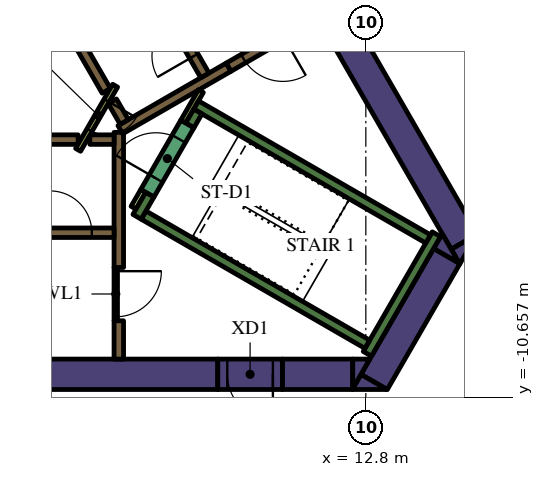
"""IFC4 building model, lengths in metres.
Left out: names, types, materials, properties, quantities, classifications, styles, units other than length and angle.
Written with IfcOpenShell. Run it as: python <this file> out.ifc"""

import sys

from ifc_helpers import new_model, si_unit, direction, frame, frame_2d, origin, place, context, subcontext, project, spatial, polyline, rectangle, outline, extrude, element, fill, save


model = new_model("IFC4")
c1 = context("Model", 3, precision=1e-05, world=origin(), true_north=direction((0.0, 1.0)))
c2 = subcontext(c1, "Body", "Model", "MODEL_VIEW")
j1 = project(units=[si_unit("LENGTHUNIT", "METRE"), si_unit("PLANEANGLEUNIT", "RADIAN")], contexts=[c1])
p1 = place(None, origin())
s1 = spatial("IfcSite", under=j1, at=p1, CompositionType="ELEMENT")
p2 = place(p1, origin())
s2 = spatial("IfcBuilding", under=s1, at=p2, CompositionType="ELEMENT")
p3 = place(p2, frame((0.0, 0.0, 145.8)))
s3 = spatial("IfcBuildingStorey", under=s2, at=p3, CompositionType="ELEMENT", Elevation=145.8)
p4 = place(p3, frame((9.129, 4.289, 0.0), z_axis=(0.0, 0.0, 1.0), x_axis=(0.499995742806, -0.866027861663, 0.0)))
e1 = element("IfcWall", 1, at=p4, inside=s3, PredefinedType="SOLIDWALL", context=c2, shape_type="SweptSolid", body=[
    extrude(rectangle(XDim=12.527, YDim=0.8, at=frame_2d((6.264, 0.0))), origin(), (0.0, 0.0, 1.0), 4.2),
])
p5 = place(p3, origin())
e2 = element("IfcWall", 2, at=p5, inside=s3, PredefinedType="SOLIDWALL", context=c2, shape_type="SweptSolid", body=[
    extrude(outline(polyline([(15.271, -7.15), (15.047, -6.762), (15.719, -6.374), (15.271, -7.15)])), origin(), (0.0, 0.0, 1.0), 4.2),
])
p6 = place(p3, frame((13.018, -10.252, 0.0), z_axis=(0.0, 0.0, 1.0), x_axis=(0.499984020225, 0.866034629516, 0.0)))
e3 = element("IfcWall", 3, at=p6, inside=s3, PredefinedType="SOLIDWALL", context=c2, shape_type="SweptSolid", body=[
    extrude(rectangle(XDim=3.824, YDim=0.8, at=frame_2d((1.912, 0.0))), origin(), (0.0, 0.0, 1.0), 4.2),
])
e4 = element("IfcWall", 4, at=p5, inside=s3, PredefinedType="SOLIDWALL", context=c2, shape_type="SweptSolid", body=[
    extrude(outline(polyline([(12.671, -10.053), (13.358, -10.45), (12.442, -10.45), (12.671, -10.053)])), origin(), (0.0, 0.0, 1.0), 4.2),
])
e5 = element("IfcWall", 5, at=p5, inside=s3, PredefinedType="SOLIDWALL", context=c2, shape_type="SweptSolid", body=[
    extrude(outline(polyline([(14.809, -6.35), (15.257, -7.126), (14.585, -6.738), (14.809, -6.35)])), origin(), (0.0, 0.0, 1.0), 4.2),
])
p7 = place(p3, frame((10.604, -10.05, 0.0), z_axis=(0.0, 0.0, 1.0), x_axis=(1.0, 0.0, 0.0)))
e6 = element("IfcWall", 6, at=p7, inside=s3, PredefinedType="SOLIDWALL", context=c2, shape_type="SweptSolid", body=[
    extrude(rectangle(XDim=1.849, YDim=0.8, at=frame_2d((0.925, 0.0))), origin(), (0.0, 0.0, 1.0), 4.2),
])
e7 = element("IfcWall", 7, at=p5, inside=s3, PredefinedType="SOLIDWALL", context=c2, shape_type="SweptSolid", body=[
    extrude(outline(polyline([(12.904, -9.65), (12.456, -10.426), (12.456, -9.65), (12.904, -9.65)])), origin(), (0.0, 0.0, 1.0), 4.2),
])
p8 = place(p3, frame((-13.378, -10.05, 0.0), z_axis=(0.0, 0.0, 1.0), x_axis=(1.0, 0.0, 0.0)))
e8 = element("IfcWall", 8, at=p8, inside=s3, PredefinedType="SOLIDWALL", context=c2, shape_type="SweptSolid", body=[
    extrude(rectangle(XDim=22.282, YDim=0.8, at=frame_2d((11.141, 0.0))), origin(), (0.0, 0.0, 1.0), 4.2),
])
p9 = place(p3, frame((12.84, -9.511, 0.0), z_axis=(0.0, 0.0, 1.0), x_axis=(0.499997733992, 0.866026712061, 0.0)))
e9 = element("IfcWall", 9, at=p9, inside=s3, PredefinedType="SOLIDWALL", context=c2, shape_type="SweptSolid", body=[
    extrude(rectangle(XDim=3.634, YDim=0.25, at=frame_2d((1.817, 0.0))), origin(), (0.0, 0.0, 1.0), 4.2),
])
p10 = place(p3, frame((12.84, -9.261, 0.0), z_axis=(0.0, 0.0, 1.0), x_axis=(-0.866013990052, 0.500019768644, 0.0)))
e10 = element("IfcWall", 10, at=p10, inside=s3, PredefinedType="SOLIDWALL", context=c2, shape_type="SweptSolid", body=[
    extrude(rectangle(XDim=6.8, YDim=0.25, at=frame_2d((3.4, 0.0))), origin(), (0.0, 0.0, 1.0), 4.2),
])
p11 = place(p3, frame((6.78, -5.906, 0.0), z_axis=(0.0, 0.0, 1.0), x_axis=(0.500223362819, 0.865896406789, 0.0)))
e11 = element("IfcWall", 11, at=p11, inside=s3, PredefinedType="SOLIDWALL", context=c2, shape_type="SweptSolid", body=[
    extrude(rectangle(XDim=0.675, YDim=0.25, at=frame_2d((0.337, 0.0))), origin(), (0.0, 0.0, 1.0), 4.2),
])
p12 = place(p3, frame((8.334, -2.964, 0.0), z_axis=(0.0, 0.0, 1.0), x_axis=(0.866016039709, -0.500016218704, 0.0)))
e12 = element("IfcWall", 12, at=p12, inside=s3, PredefinedType="SOLIDWALL", context=c2, shape_type="SweptSolid", body=[
    extrude(rectangle(XDim=7.05, YDim=0.25, at=frame_2d((3.525, 0.0))), origin(), (0.0, 0.0, 1.0), 4.2),
])
p13 = place(p3, frame((8.168, -3.503, 0.0), z_axis=(0.0, 0.0, 1.0), x_axis=(0.49972245349, 0.866185586049, 0.0)))
e13 = element("IfcWall", 13, at=p13, inside=s3, PredefinedType="SOLIDWALL", context=c2, shape_type="SweptSolid", body=[
    extrude(rectangle(XDim=0.425, YDim=0.25, at=frame_2d((0.212, 0.0))), origin(), (0.0, 0.0, 1.0), 4.2),
])
p14 = place(p3, frame((-5.259, -3.875, 0.0), z_axis=(0.0, 0.0, 1.0), x_axis=(1.0, 0.0, 0.0)))
e14 = element("IfcWall", 14, at=p14, inside=s3, PredefinedType="SOLIDWALL", context=c2, shape_type="SweptSolid", body=[
    extrude(rectangle(XDim=10.489, YDim=0.25, at=frame_2d((5.244, 0.0))), origin(), (0.0, 0.0, 1.0), 4.2),
])
p15 = place(p3, frame((6.3, -7.24, 0.0), z_axis=(0.0, 0.0, 1.0), x_axis=(0.0, 1.0, 0.0)))
e15 = element("IfcWall", 15, at=p15, inside=s3, PredefinedType="SOLIDWALL", context=c2, shape_type="SweptSolid", body=[
    extrude(rectangle(XDim=3.556, YDim=0.25, at=frame_2d((1.778, 0.0))), origin(), (0.0, 0.0, 1.0), 4.2),
])
p16 = place(p3, frame((6.3, -9.65, 0.0), z_axis=(0.0, 0.0, 1.0), x_axis=(0.0, 1.0, 0.0)))
e16 = element("IfcWall", 16, at=p16, inside=s3, PredefinedType="SOLIDWALL", context=c2, shape_type="SweptSolid", body=[
    extrude(rectangle(XDim=1.008, YDim=0.25, at=frame_2d((0.504, 0.0))), origin(), (0.0, 0.0, 1.0), 4.2),
])
p17 = place(p3, frame((5.538, -3.875, 0.0), z_axis=(0.0, 0.0, 1.0), x_axis=(1.0, 0.0, 0.0)))
e17 = element("IfcWall", 17, at=p17, inside=s3, PredefinedType="SOLIDWALL", context=c2, shape_type="SweptSolid", body=[
    extrude(rectangle(XDim=0.637, YDim=0.25, at=frame_2d((0.318, 0.0))), origin(), (0.0, 0.0, 1.0), 4.2),
])
p18 = place(p3, frame((9.19, -1.969, 0.0), z_axis=(0.0, 0.0, 1.0), x_axis=(-0.866057109641, -0.499945079824, 0.0)))
e18 = element("IfcWall", 18, at=p18, inside=s3, PredefinedType="SOLIDWALL", context=c2, shape_type="SweptSolid", body=[
    extrude(rectangle(XDim=3.291, YDim=0.25, at=frame_2d((1.646, 0.0))), origin(), (0.0, 0.0, 1.0), 4.2),
])
p19 = place(p3, frame((6.13, -2.867, 0.0), z_axis=(0.0, 0.0, 1.0), x_axis=(0.500160776593, -0.865932559475, 0.0)))
e19 = element("IfcWall", 19, at=p19, inside=s3, PredefinedType="SOLIDWALL", context=c2, shape_type="SweptSolid", body=[
    extrude(rectangle(XDim=0.627, YDim=0.25, at=frame_2d((0.313, 0.0))), origin(), (0.0, 0.0, 1.0), 4.2),
])
p20 = place(p3, frame((5.97, -2.591, 0.0), z_axis=(0.0, 0.0, 1.0), x_axis=(-0.499994469932, 0.866028596547, 0.0)))
e20 = element("IfcWall", 20, at=p20, inside=s3, PredefinedType="SOLIDWALL", context=c2, shape_type="SweptSolid", body=[
    extrude(rectangle(XDim=10.488, YDim=0.25, at=frame_2d((5.244, 0.0))), origin(), (0.0, 0.0, 1.0), 4.2),
])
p21 = place(p3, frame((6.945, -5.222, 0.0), z_axis=(0.0, 0.0, 1.0), x_axis=(-0.499818422106, -0.866130212453, 0.0)))
e21 = element("IfcWall", 21, at=p21, inside=s3, PredefinedType="PARTITIONING", context=c2, shape_type="SweptSolid", body=[
    extrude(rectangle(XDim=0.514, YDim=0.15, at=frame_2d((0.257, 0.0))), origin(), (0.0, 0.0, 1.0), 3.15),
])
p22 = place(p3, frame((8.459, -2.599, 0.0), z_axis=(0.0, 0.0, 1.0), x_axis=(-0.500041054325, -0.866001699761, 0.0)))
e22 = element("IfcWall", 22, at=p22, inside=s3, PredefinedType="PARTITIONING", context=c2, shape_type="SweptSolid", body=[
    extrude(rectangle(XDim=0.929, YDim=0.15, at=frame_2d((0.464, 0.0))), origin(), (0.0, 0.0, 1.0), 4.2),
])
p23 = place(p3, frame((-6.175, -6.325, 0.0), z_axis=(0.0, 0.0, 1.0), x_axis=(1.0, 0.0, 0.0)))
e23 = element("IfcWall", 23, at=p23, inside=s3, PredefinedType="SOLIDWALL", context=c2, shape_type="SweptSolid", body=[
    extrude(rectangle(XDim=12.35, YDim=0.25, at=frame_2d((6.175, 0.0))), origin(), (0.0, 0.0, 1.0), 4.2),
])
p24 = place(p23, frame((0.585, 0.0, 0.0)))
e24 = element("IfcOpeningElement", 24, at=p24, cuts=e23, PredefinedType="OPENING", context=c2, shape_type="SweptSolid", body=[
    extrude(rectangle(XDim=1.1, YDim=2.1, at=frame_2d((0.55, 1.05))), frame((0.0, 0.135, 0.0), z_axis=(0.0, -1.0, 0.0), x_axis=(1.0, 0.0, 0.0)), (0.0, 0.0, 1.0), 0.27),
])
p25 = place(p23, frame((3.105, 0.0, 0.0)))
e25 = element("IfcOpeningElement", 25, at=p25, cuts=e23, PredefinedType="OPENING", context=c2, shape_type="SweptSolid", body=[
    extrude(rectangle(XDim=1.1, YDim=2.1, at=frame_2d((0.55, 1.05))), frame((0.0, 0.135, 0.0), z_axis=(0.0, -1.0, 0.0), x_axis=(1.0, 0.0, 0.0)), (0.0, 0.0, 1.0), 0.27),
])
p26 = place(p23, frame((5.625, 0.0, 0.0)))
e26 = element("IfcOpeningElement", 26, at=p26, cuts=e23, PredefinedType="OPENING", context=c2, shape_type="SweptSolid", body=[
    extrude(rectangle(XDim=1.1, YDim=2.1, at=frame_2d((0.55, 1.05))), frame((0.0, 0.135, 0.0), z_axis=(0.0, -1.0, 0.0), x_axis=(1.0, 0.0, 0.0)), (0.0, 0.0, 1.0), 0.27),
])
p27 = place(p23, frame((8.145, 0.0, 0.0)))
e27 = element("IfcOpeningElement", 27, at=p27, cuts=e23, PredefinedType="OPENING", context=c2, shape_type="SweptSolid", body=[
    extrude(rectangle(XDim=1.1, YDim=2.1, at=frame_2d((0.55, 1.05))), frame((0.0, 0.135, 0.0), z_axis=(0.0, -1.0, 0.0), x_axis=(1.0, 0.0, 0.0)), (0.0, 0.0, 1.0), 0.27),
])
p28 = place(p23, frame((10.665, 0.0, 0.0)))
e28 = element("IfcOpeningElement", 28, at=p28, cuts=e23, PredefinedType="OPENING", context=c2, shape_type="SweptSolid", body=[
    extrude(rectangle(XDim=1.1, YDim=2.1, at=frame_2d((0.55, 1.05))), frame((0.0, 0.135, 0.0), z_axis=(0.0, -1.0, 0.0), x_axis=(1.0, 0.0, 0.0)), (0.0, 0.0, 1.0), 0.27),
])
p29 = place(p3, frame((8.565, -2.185, 0.0), z_axis=(0.0, 0.0, 1.0), x_axis=(-0.499997954832, 0.866026584559, 0.0)))
e29 = element("IfcWall", 29, at=p29, inside=s3, PredefinedType="SOLIDWALL", context=c2, shape_type="SweptSolid", body=[
    extrude(rectangle(XDim=12.35, YDim=0.25, at=frame_2d((6.175, 0.0))), origin(), (0.0, 0.0, 1.0), 4.2),
])
p30 = place(p29, frame((0.585, 0.0, 0.0)))
e30 = element("IfcOpeningElement", 30, at=p30, cuts=e29, PredefinedType="OPENING", context=c2, shape_type="SweptSolid", body=[
    extrude(rectangle(XDim=1.1, YDim=2.1, at=frame_2d((0.55, 1.05))), frame((0.0, 0.135, 0.0), z_axis=(0.0, -1.0, 0.0), x_axis=(1.0, 0.0, 0.0)), (0.0, 0.0, 1.0), 0.27),
])
p31 = place(p3, frame((7.053, -5.284, 0.0), z_axis=(0.0, 0.0, 1.0), x_axis=(0.500078061341, 0.865980330357, 0.0)))
e31 = element("IfcWall", 31, at=p31, inside=s3, PredefinedType="SOLIDWALL", context=c2, shape_type="SweptSolid", body=[
    extrude(rectangle(XDim=2.1, YDim=0.4, at=frame_2d((1.05, 0.0))), origin(), (0.0, 0.0, 1.0), 4.2),
])
p32 = place(p31, frame((0.45, 0.0, 0.0)))
e32 = element("IfcOpeningElement", 32, at=p32, cuts=e31, PredefinedType="OPENING", context=c2, shape_type="SweptSolid", body=[
    extrude(rectangle(XDim=1.2, YDim=2.1, at=frame_2d((0.6, 1.05))), frame((0.0, 0.21, 0.0), z_axis=(0.0, -1.0, 0.0), x_axis=(1.0, 0.0, 0.0)), (0.0, 0.0, 1.0), 0.42),
])
p33 = place(p3, frame((6.203, -2.456, 0.0), z_axis=(0.0, 0.0, 1.0), x_axis=(-0.500043961785, -0.866000020948, 0.0)))
e33 = element("IfcWall", 33, at=p33, inside=s3, PredefinedType="PARTITIONING", context=c2, shape_type="SweptSolid", body=[
    extrude(rectangle(XDim=1.95, YDim=0.15, at=frame_2d((0.975, 0.0))), origin(), (0.0, 0.0, 1.0), 4.2),
])
p34 = place(p33, frame((0.45, 0.0, 0.0)))
e34 = element("IfcOpeningElement", 34, at=p34, cuts=e33, PredefinedType="OPENING", context=c2, shape_type="SweptSolid", body=[
    extrude(rectangle(XDim=0.9, YDim=2.1, at=frame_2d((0.45, 1.05))), frame((0.0, 0.085, 0.0), z_axis=(0.0, -1.0, 0.0), x_axis=(1.0, 0.0, 0.0)), (0.0, 0.0, 1.0), 0.17),
])
p35 = place(p3, frame((6.22, -7.237, 0.0), z_axis=(0.0, 0.0, 1.0), x_axis=(0.0, -1.0, 0.0)))
e35 = element("IfcWall", 35, at=p35, inside=s3, PredefinedType="PARTITIONING", context=c2, shape_type="SweptSolid", body=[
    extrude(rectangle(XDim=1.4, YDim=0.09, at=frame_2d((0.7, 0.0))), origin(), (0.0, 0.0, 1.0), 3.15),
])
p36 = place(p35, frame((0.1, 0.0, 0.0)))
e36 = element("IfcOpeningElement", 36, at=p36, cuts=e35, PredefinedType="OPENING", context=c2, shape_type="SweptSolid", body=[
    extrude(rectangle(XDim=1.2, YDim=2.1, at=frame_2d((0.6, 1.05))), frame((0.0, 0.055, 0.0), z_axis=(0.0, -1.0, 0.0), x_axis=(1.0, 0.0, 0.0)), (0.0, 0.0, 1.0), 0.11),
])
p37 = place(p3, frame((11.009, -0.919, 0.0), z_axis=(0.0, 0.0, 1.0), x_axis=(-0.866059744384, -0.49994051562, 0.0)))
e37 = element("IfcWall", 37, at=p37, inside=s3, PredefinedType="SOLIDWALL", context=c2, shape_type="SweptSolid", body=[
    extrude(rectangle(XDim=2.1, YDim=0.25, at=frame_2d((1.05, 0.0))), origin(), (0.0, 0.0, 1.0), 4.2),
])
p38 = place(p37, frame((0.45, 0.0, 0.0)))
e38 = element("IfcOpeningElement", 38, at=p38, cuts=e37, PredefinedType="OPENING", context=c2, shape_type="SweptSolid", body=[
    extrude(rectangle(XDim=1.2, YDim=2.1, at=frame_2d((0.6, 1.05))), frame((0.0, 0.135, 0.0), z_axis=(0.0, -1.0, 0.0), x_axis=(1.0, 0.0, 0.0)), (0.0, 0.0, 1.0), 0.27),
])
p39 = place(p3, frame((10.604, -10.05, 0.0), z_axis=(0.0, 0.0, 1.0), x_axis=(-1.0, 0.0, 0.0)))
e39 = element("IfcWall", 39, at=p39, inside=s3, PredefinedType="SOLIDWALL", context=c2, shape_type="SweptSolid", body=[
    extrude(rectangle(XDim=1.7, YDim=0.8, at=frame_2d((0.85, 0.0))), origin(), (0.0, 0.0, 1.0), 4.2),
])
p40 = place(p39, frame((0.25, 0.0, 0.0)))
e40 = element("IfcOpeningElement", 40, at=p40, cuts=e39, PredefinedType="OPENING", context=c2, shape_type="SweptSolid", body=[
    extrude(rectangle(XDim=1.2, YDim=2.1, at=frame_2d((0.6, 1.05))), frame((0.0, 0.41, 0.0), z_axis=(0.0, -1.0, 0.0), x_axis=(1.0, 0.0, 0.0)), (0.0, 0.0, 1.0), 0.82),
])
p41 = place(p3, frame((14.825, -12.722, 0.0), z_axis=(0.0, 0.0, 1.0), x_axis=(0.499981686864, 0.86603597662, 0.0)))
e41 = element("IfcWall", 41, at=p41, inside=s3, PredefinedType="PARTITIONING", context=c2, shape_type="SweptSolid", body=[
    extrude(rectangle(XDim=3.506, YDim=0.2, at=frame_2d((1.753, 0.0))), origin(), (0.0, 0.0, 1.0), 3.15),
])
p42 = place(p3, frame((18.504, -6.35, 0.0), z_axis=(0.0, 0.0, 1.0), x_axis=(-0.499995029582, 0.866028273438, 0.0)))
e42 = element("IfcWall", 42, at=p42, inside=s3, PredefinedType="PARTITIONING", context=c2, shape_type="SweptSolid", body=[
    extrude(rectangle(XDim=9.717, YDim=0.2, at=frame_2d((4.859, 0.0))), origin(), (0.0, 0.0, 1.0), 3.15),
])
p43 = place(p28, origin())
e43 = element("IfcDoor", 43, at=p43, inside=s3, OperationType="DOUBLE_DOOR_SLIDING", PredefinedType="DOOR", context=c2, shape_type="SweptSolid", body=[
    extrude(rectangle(XDim=1.1, YDim=2.1, at=frame_2d((0.55, 1.05))), frame((0.0, 0.025, 0.0), z_axis=(0.0, -1.0, 0.0), x_axis=(1.0, 0.0, 0.0)), (0.0, 0.0, 1.0), 0.05),
])
fill(e28, e43)
p44 = place(p30, origin())
e44 = element("IfcDoor", 44, at=p44, inside=s3, OperationType="DOUBLE_DOOR_SLIDING", PredefinedType="DOOR", context=c2, shape_type="SweptSolid", body=[
    extrude(rectangle(XDim=1.1, YDim=2.1, at=frame_2d((0.55, 1.05))), frame((0.0, 0.025, 0.0), z_axis=(0.0, -1.0, 0.0), x_axis=(1.0, 0.0, 0.0)), (0.0, 0.0, 1.0), 0.05),
])
fill(e30, e44)
p45 = place(p32, origin())
e45 = element("IfcDoor", 45, at=p45, inside=s3, OperationType="SINGLE_SWING_LEFT", PredefinedType="DOOR", context=c2, shape_type="SweptSolid", body=[
    extrude(rectangle(XDim=1.2, YDim=2.1, at=frame_2d((0.6, 1.05))), frame((0.0, 0.025, 0.0), z_axis=(0.0, -1.0, 0.0), x_axis=(1.0, 0.0, 0.0)), (0.0, 0.0, 1.0), 0.05),
])
fill(e32, e45)
p46 = place(p34, origin())
e46 = element("IfcDoor", 46, at=p46, inside=s3, OperationType="SINGLE_SWING_LEFT", PredefinedType="DOOR", context=c2, shape_type="SweptSolid", body=[
    extrude(rectangle(XDim=0.9, YDim=2.1, at=frame_2d((0.45, 1.05))), frame((0.0, 0.025, 0.0), z_axis=(0.0, -1.0, 0.0), x_axis=(1.0, 0.0, 0.0)), (0.0, 0.0, 1.0), 0.05),
])
fill(e34, e46)
p47 = place(p36, origin())
e47 = element("IfcDoor", 47, at=p47, inside=s3, OperationType="SINGLE_SWING_LEFT", PredefinedType="DOOR", context=c2, shape_type="SweptSolid", body=[
    extrude(rectangle(XDim=1.2, YDim=2.1, at=frame_2d((0.6, 1.05))), frame((0.0, 0.025, 0.0), z_axis=(0.0, -1.0, 0.0), x_axis=(1.0, 0.0, 0.0)), (0.0, 0.0, 1.0), 0.05),
])
fill(e36, e47)
p48 = place(p38, origin())
e48 = element("IfcDoor", 48, at=p48, inside=s3, OperationType="SINGLE_SWING_LEFT", PredefinedType="DOOR", context=c2, shape_type="SweptSolid", body=[
    extrude(rectangle(XDim=1.2, YDim=2.1, at=frame_2d((0.6, 1.05))), frame((0.0, 0.025, 0.0), z_axis=(0.0, -1.0, 0.0), x_axis=(1.0, 0.0, 0.0)), (0.0, 0.0, 1.0), 0.05),
])
fill(e38, e48)
p49 = place(p40, origin())
e49 = element("IfcDoor", 49, at=p49, inside=s3, OperationType="SINGLE_SWING_LEFT", PredefinedType="DOOR", context=c2, shape_type="SweptSolid", body=[
    extrude(rectangle(XDim=1.2, YDim=2.1, at=frame_2d((0.6, 1.05))), frame((0.0, 0.025, 0.0), z_axis=(0.0, -1.0, 0.0), x_axis=(1.0, 0.0, 0.0)), (0.0, 0.0, 1.0), 0.05),
])
fill(e40, e49)
save(model, sys.argv[1])
